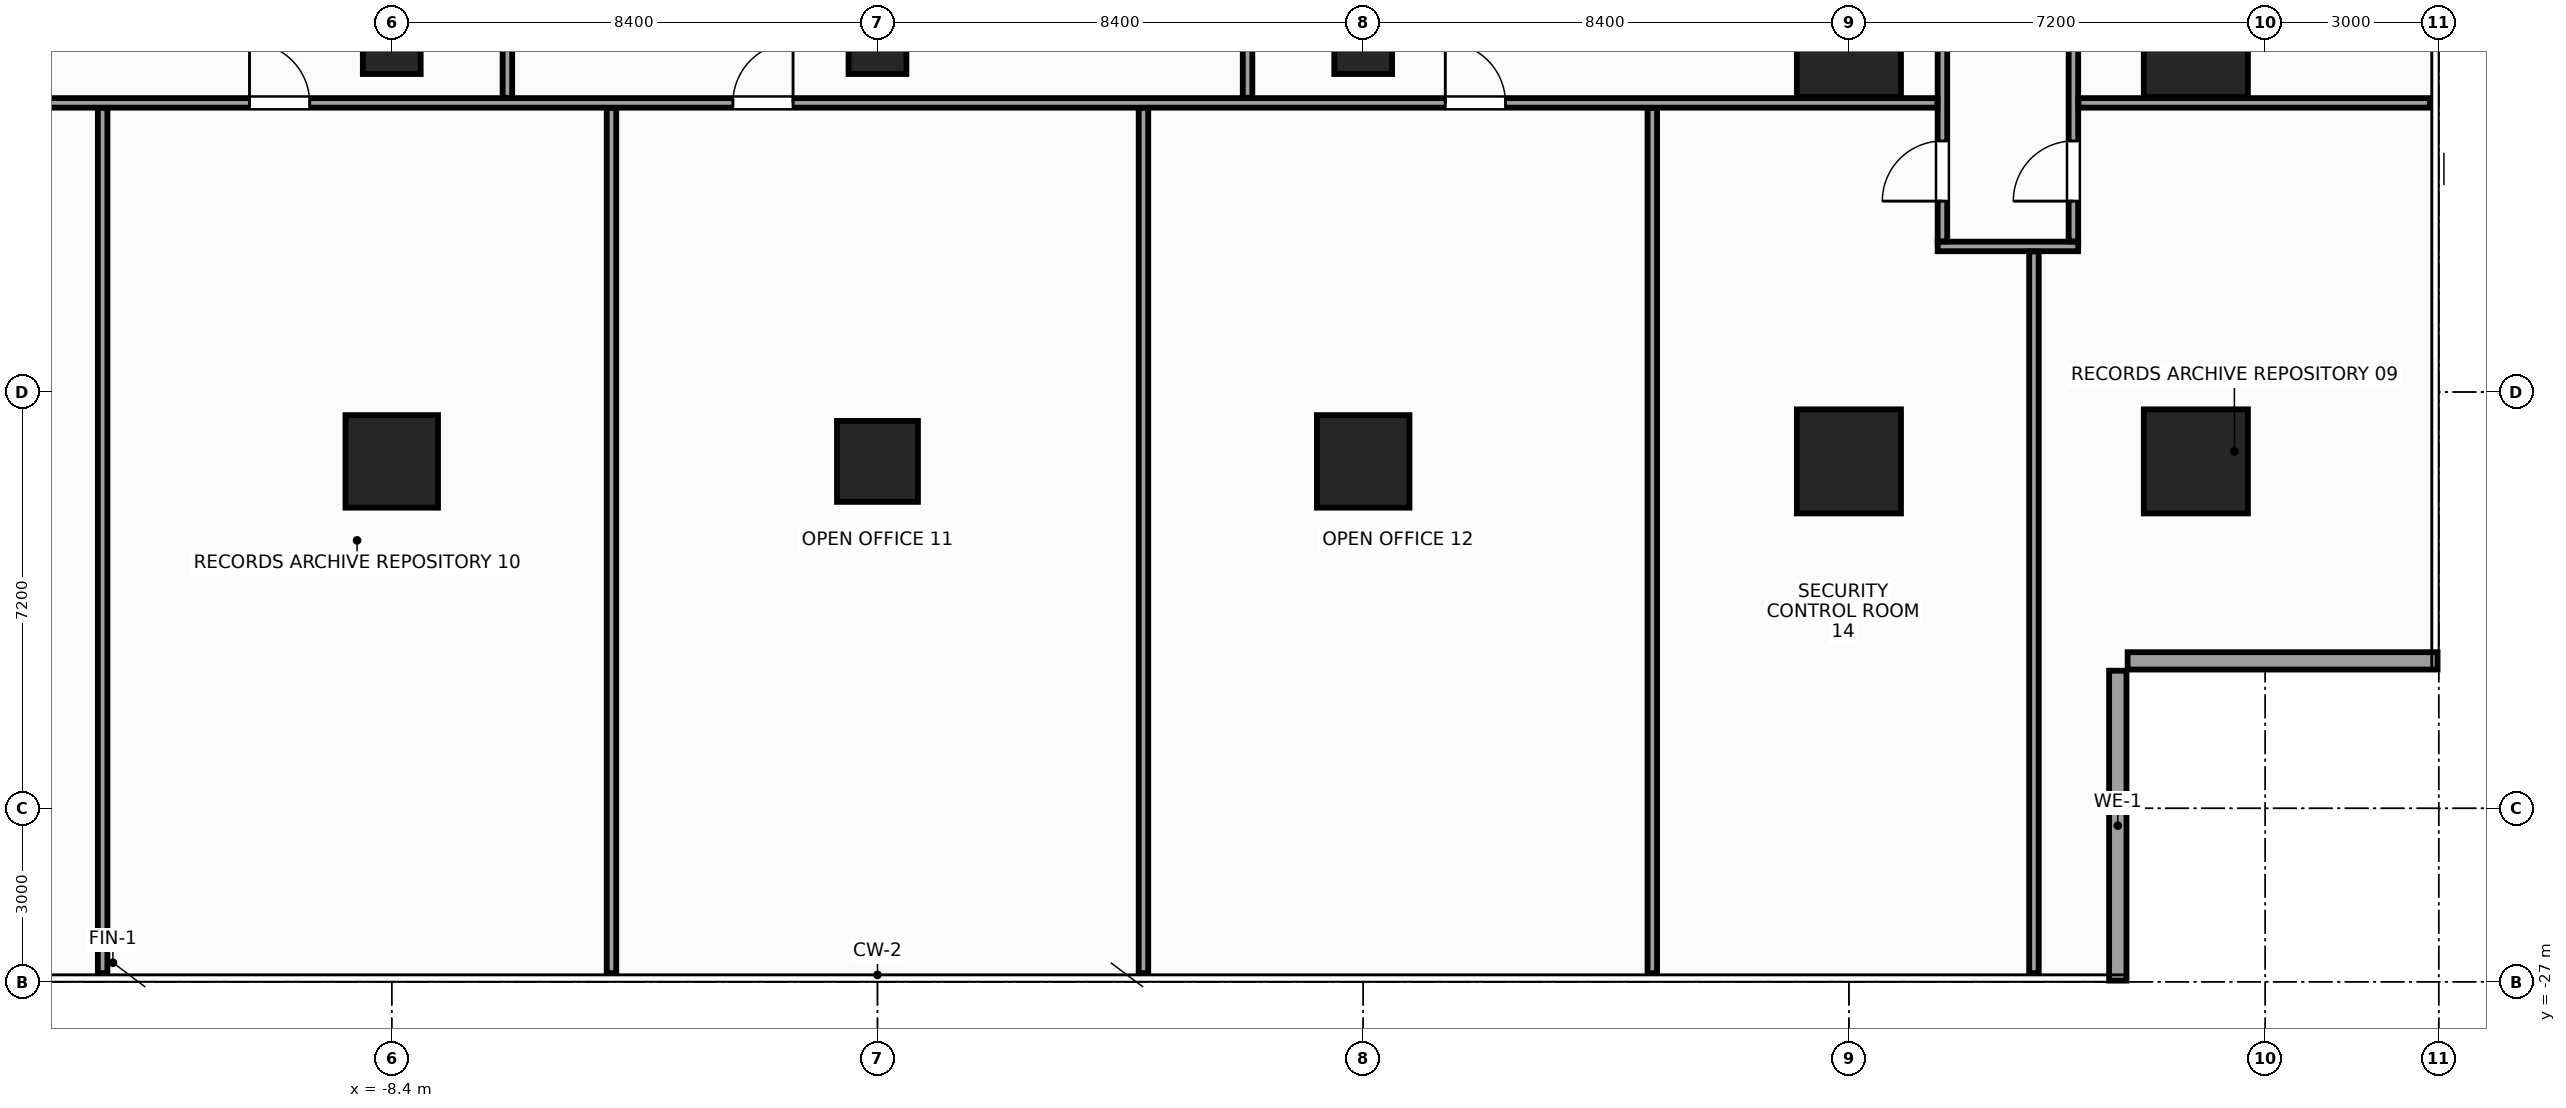
"""IFC4 building model, lengths in metres.
Left out: names, types, materials, properties, quantities, classifications, styles, units other than length and angle.
Written with IfcOpenShell. Run it as: python <this file> out.ifc"""

import sys

from ifc_helpers import new_model, si_unit, direction, frame, frame_2d, origin, origin_2d, place, context, subcontext, project, spatial, rectangle, hollow_rectangle, extrude, source, transform, mapped, element, fill, save


model = new_model("IFC4")
c1 = context("Model", 3, precision=1e-05, world=origin(), true_north=direction((0.0, 1.0)))
c2 = subcontext(c1, "Body", "Model", "MODEL_VIEW")
j1 = project(units=[si_unit("LENGTHUNIT", "METRE"), si_unit("PLANEANGLEUNIT", "RADIAN")], contexts=[c1])
p1 = place(None, origin())
s1 = spatial("IfcSite", under=j1, at=p1, CompositionType="ELEMENT")
p2 = place(p1, origin())
s2 = spatial("IfcBuilding", under=s1, at=p2, CompositionType="ELEMENT")
p3 = place(p2, frame((0.0, 0.0, 59.6)))
s3 = spatial("IfcBuildingStorey", under=s2, at=p3, CompositionType="ELEMENT", Elevation=59.6)
m1 = source(origin(), c2, "Body", "SweptSolid", [
    extrude(rectangle(XDim=1.8, YDim=1.8, at=origin_2d()), origin(), (0.0, 0.0, 1.0), 3.6),
])
for number, where, z_axis, x_axis in (
    (1, (16.8, -18.0, 0.0), (0.0, 0.0, 1.0), (1.0, 0.0, 0.0)),
    (2, (16.8, -10.8, 0.0), (0.0, 0.0, 1.0), (1.0, 0.0, 0.0)),
    (3, (22.8, -18.0, 0.0), (0.0, 0.0, 1.0), (1.0, 0.0, 0.0)),
    (4, (22.8, -10.8, 0.0), (0.0, 0.0, 1.0), (1.0, 0.0, 0.0)),
):
    element("IfcColumn", number, at=place(p3, frame(where, z_axis=z_axis, x_axis=x_axis)), inside=s3, PredefinedType="COLUMN", context=c2, shape_type="MappedRepresentation", body=[
        mapped(m1, transform((0.0, 0.0, 0.0), x_axis=(1.0, 0.0, 0.0), y_axis=(0.0, 1.0, 0.0), z_axis=(0.0, 0.0, 1.0), scale=1.0)),
    ])
m2 = source(origin(), c2, "Body", "SweptSolid", [
    extrude(rectangle(XDim=1.6, YDim=1.6, at=origin_2d()), origin(), (0.0, 0.0, 1.0), 3.6),
])
p4 = place(p3, frame((-8.4, -18.0, 0.0), z_axis=(0.0, 0.0, 1.0), x_axis=(1.0, 0.0, 0.0)))
e5 = element("IfcColumn", 5, at=p4, inside=s3, PredefinedType="COLUMN", context=c2, shape_type="MappedRepresentation", body=[
    mapped(m2, transform((0.0, 0.0, 0.0), x_axis=(1.0, 0.0, 0.0), y_axis=(0.0, 1.0, 0.0), z_axis=(0.0, 0.0, 1.0), scale=1.0)),
])
m3 = source(origin(), c2, "Body", "SweptSolid", [
    extrude(hollow_rectangle(XDim=1.0, YDim=1.0, WallThickness=0.045, at=origin_2d()), origin(), (0.0, 0.0, 1.0), 3.6),
])
p5 = place(p3, frame((-8.4, -10.8, 0.0), z_axis=(0.0, 0.0, 1.0), x_axis=(1.0, 0.0, 0.0)))
e6 = element("IfcColumn", 6, at=p5, inside=s3, PredefinedType="COLUMN", context=c2, shape_type="MappedRepresentation", body=[
    mapped(m3, transform((0.0, 0.0, 0.0), x_axis=(1.0, 0.0, 0.0), y_axis=(0.0, 1.0, 0.0), z_axis=(0.0, 0.0, 1.0), scale=1.0)),
])
p6 = place(p3, frame((8.4, -18.0, 0.0), z_axis=(0.0, 0.0, 1.0), x_axis=(1.0, 0.0, 0.0)))
e7 = element("IfcColumn", 7, at=p6, inside=s3, PredefinedType="COLUMN", context=c2, shape_type="MappedRepresentation", body=[
    mapped(m2, transform((0.0, 0.0, 0.0), x_axis=(1.0, 0.0, 0.0), y_axis=(0.0, 1.0, 0.0), z_axis=(0.0, 0.0, 1.0), scale=1.0)),
])
p7 = place(p3, frame((8.4, -10.8, 0.0), z_axis=(0.0, 0.0, 1.0), x_axis=(1.0, 0.0, 0.0)))
e8 = element("IfcColumn", 8, at=p7, inside=s3, PredefinedType="COLUMN", context=c2, shape_type="MappedRepresentation", body=[
    mapped(m3, transform((0.0, 0.0, 0.0), x_axis=(1.0, 0.0, 0.0), y_axis=(0.0, 1.0, 0.0), z_axis=(0.0, 0.0, 1.0), scale=1.0)),
])
m4 = source(origin(), c2, "Body", "SweptSolid", [
    extrude(rectangle(XDim=1.4, YDim=1.4, at=origin_2d()), origin(), (0.0, 0.0, 1.0), 3.6),
])
p8 = place(p3, frame((0.0, -18.0, 0.0), z_axis=(0.0, 0.0, 1.0), x_axis=(1.0, 0.0, 0.0)))
e9 = element("IfcColumn", 9, at=p8, inside=s3, PredefinedType="COLUMN", context=c2, shape_type="MappedRepresentation", body=[
    mapped(m4, transform((0.0, 0.0, 0.0), x_axis=(1.0, 0.0, 0.0), y_axis=(0.0, 1.0, 0.0), z_axis=(0.0, 0.0, 1.0), scale=1.0)),
])
m5 = source(origin(), c2, "Body", "SweptSolid", [
    extrude(rectangle(XDim=1.0, YDim=1.0, at=origin_2d()), origin(), (0.0, 0.0, 1.0), 3.6),
])
p9 = place(p3, frame((0.0, -10.8, 0.0), z_axis=(0.0, 0.0, 1.0), x_axis=(1.0, 0.0, 0.0)))
e10 = element("IfcColumn", 10, at=p9, inside=s3, PredefinedType="COLUMN", context=c2, shape_type="MappedRepresentation", body=[
    mapped(m5, transform((0.0, 0.0, 0.0), x_axis=(1.0, 0.0, 0.0), y_axis=(0.0, 1.0, 0.0), z_axis=(0.0, 0.0, 1.0), scale=1.0)),
])
m6 = source(origin(), c2, "Body", "SweptSolid", [
    extrude(rectangle(XDim=5.36, YDim=0.3, at=frame_2d((2.68, 0.0))), origin(), (0.0, 0.0, 1.0), 2.74),
])
for number, where, z_axis, x_axis in (
    (11, (21.45, -26.98, 0.0), (0.0, 0.0, 1.0), (0.0, 1.0, 0.0)),
    (12, (21.62, -21.45, 0.0), (0.0, 0.0, 1.0), (1.0, 0.0, 0.0)),
):
    element("IfcWall", number, at=place(p3, frame(where, z_axis=z_axis, x_axis=x_axis)), inside=s3, PredefinedType="STANDARD", context=c2, shape_type="MappedRepresentation", body=[
        mapped(m6, transform((0.0, 0.0, 0.0), x_axis=(1.0, 0.0, 0.0), y_axis=(0.0, 1.0, 0.0), z_axis=(0.0, 0.0, 1.0), scale=1.0)),
    ])
m7 = source(origin(), c2, "Body", "SweptSolid", [
    extrude(rectangle(XDim=2.43, YDim=0.165, at=frame_2d((1.215, 0.0))), origin(), (0.0, 0.0, 1.0), 2.745),
])
p10 = place(p3, frame((18.335, -14.282, 0.0), z_axis=(0.0, 0.0, 1.0), x_axis=(1.0, 0.0, 0.0)))
e13 = element("IfcWall", 13, at=p10, inside=s3, PredefinedType="PARTITIONING", context=c2, shape_type="MappedRepresentation", body=[
    mapped(m7, transform((0.0, 0.0, 0.0), x_axis=(1.0, 0.0, 0.0), y_axis=(0.0, 1.0, 0.0), z_axis=(0.0, 0.0, 1.0), scale=1.0)),
])
m8 = source(origin(), c2, "Body", "SweptSolid", [
    extrude(rectangle(XDim=21.995, YDim=0.165, at=frame_2d((10.998, 0.0))), origin(), (0.0, 0.0, 1.0), 2.745),
])
p11 = place(p3, frame((18.417, -14.195, 0.0), z_axis=(0.0, 0.0, 1.0), x_axis=(0.0, 1.0, 0.0)))
e14 = element("IfcWall", 14, at=p11, inside=s3, PredefinedType="PARTITIONING", context=c2, shape_type="MappedRepresentation", body=[
    mapped(m8, transform((0.0, 0.0, 0.0), x_axis=(1.0, 0.0, 0.0), y_axis=(0.0, 1.0, 0.0), z_axis=(0.0, 0.0, 1.0), scale=1.0)),
])
p12 = place(p11, frame((11.634, 0.0, 0.0)))
e15 = element("IfcOpeningElement", 15, at=p12, cuts=e14, PredefinedType="OPENING", context=c2, shape_type="SweptSolid", body=[
    extrude(rectangle(XDim=1.04, YDim=2.2, at=frame_2d((0.52, 1.1))), frame((0.0, 0.094, 0.0), z_axis=(0.0, -1.0, 0.0), x_axis=(1.0, 0.0, 0.0)), (0.0, 0.0, 1.0), 0.189),
])
p13 = place(p11, frame((0.696, 0.0, 0.0)))
e16 = element("IfcOpeningElement", 16, at=p13, cuts=e14, PredefinedType="OPENING", context=c2, shape_type="SweptSolid", body=[
    extrude(rectangle(XDim=1.04, YDim=2.2, at=frame_2d((0.52, 1.1))), frame((0.0, 0.094, 0.0), z_axis=(0.0, -1.0, 0.0), x_axis=(1.0, 0.0, 0.0)), (0.0, 0.0, 1.0), 0.189),
])
m9 = source(origin(), c2, "Body", "SweptSolid", [
    extrude(rectangle(XDim=24.108, YDim=0.165, at=frame_2d((12.054, 0.0))), origin(), (0.0, 0.0, 1.0), 2.745),
])
p14 = place(p3, frame((20.683, -14.195, 0.0), z_axis=(0.0, 0.0, 1.0), x_axis=(0.0, 1.0, 0.0)))
e17 = element("IfcWall", 17, at=p14, inside=s3, PredefinedType="PARTITIONING", context=c2, shape_type="MappedRepresentation", body=[
    mapped(m9, transform((0.0, 0.0, 0.0), x_axis=(1.0, 0.0, 0.0), y_axis=(0.0, 1.0, 0.0), z_axis=(0.0, 0.0, 1.0), scale=1.0)),
])
p15 = place(p14, frame((12.052, 0.0, 0.0)))
e18 = element("IfcOpeningElement", 18, at=p15, cuts=e17, PredefinedType="OPENING", context=c2, shape_type="SweptSolid", body=[
    extrude(rectangle(XDim=1.04, YDim=2.2, at=frame_2d((0.52, 1.1))), frame((0.0, 0.094, 0.0), z_axis=(0.0, -1.0, 0.0), x_axis=(1.0, 0.0, 0.0)), (0.0, 0.0, 1.0), 0.189),
])
p16 = place(p14, frame((0.696, 0.0, 0.0)))
e19 = element("IfcOpeningElement", 19, at=p16, cuts=e17, PredefinedType="OPENING", context=c2, shape_type="SweptSolid", body=[
    extrude(rectangle(XDim=1.04, YDim=2.2, at=frame_2d((0.52, 1.1))), frame((0.0, 0.094, 0.0), z_axis=(0.0, -1.0, 0.0), x_axis=(1.0, 0.0, 0.0)), (0.0, 0.0, 1.0), 0.189),
])
m10 = source(origin(), c2, "Body", "SweptSolid", [
    extrude(rectangle(XDim=36.66, YDim=0.165, at=frame_2d((18.33, 0.0))), origin(), (0.0, 0.0, 1.0), 2.945),
])
p17 = place(p3, frame((-18.33, -11.8, 0.0), z_axis=(0.0, 0.0, 1.0), x_axis=(1.0, 0.0, 0.0)))
e20 = element("IfcWall", 20, at=p17, inside=s3, PredefinedType="PARTITIONING", context=c2, shape_type="MappedRepresentation", body=[
    mapped(m10, transform((0.0, 0.0, 0.0), x_axis=(1.0, 0.0, 0.0), y_axis=(0.0, 1.0, 0.0), z_axis=(0.0, 0.0, 1.0), scale=1.0)),
])
p18 = place(p17, frame((7.47, 0.0, 0.0)))
e21 = element("IfcOpeningElement", 21, at=p18, cuts=e20, PredefinedType="OPENING", context=c2, shape_type="SweptSolid", body=[
    extrude(rectangle(XDim=1.04, YDim=2.2, at=frame_2d((0.52, 1.1))), frame((0.0, 0.094, 0.0), z_axis=(0.0, -1.0, 0.0), x_axis=(1.0, 0.0, 0.0)), (0.0, 0.0, 1.0), 0.189),
])
p19 = place(p17, frame((15.83, 0.0, 0.0)))
e22 = element("IfcOpeningElement", 22, at=p19, cuts=e20, PredefinedType="OPENING", context=c2, shape_type="SweptSolid", body=[
    extrude(rectangle(XDim=1.04, YDim=2.2, at=frame_2d((0.52, 1.1))), frame((0.0, 0.094, 0.0), z_axis=(0.0, -1.0, 0.0), x_axis=(1.0, 0.0, 0.0)), (0.0, 0.0, 1.0), 0.189),
])
p20 = place(p17, frame((28.15, 0.0, 0.0)))
e23 = element("IfcOpeningElement", 23, at=p20, cuts=e20, PredefinedType="OPENING", context=c2, shape_type="SweptSolid", body=[
    extrude(rectangle(XDim=1.04, YDim=2.2, at=frame_2d((0.52, 1.1))), frame((0.0, 0.094, 0.0), z_axis=(0.0, -1.0, 0.0), x_axis=(1.0, 0.0, 0.0)), (0.0, 0.0, 1.0), 0.189),
])
m11 = source(origin(), c2, "Body", "SweptSolid", [
    extrude(rectangle(XDim=6.08, YDim=0.165, at=frame_2d((3.04, 0.0))), origin(), (0.0, 0.0, 1.0), 2.945),
])
p21 = place(p3, frame((20.77, -11.8, 0.0), z_axis=(0.0, 0.0, 1.0), x_axis=(1.0, 0.0, 0.0)))
e24 = element("IfcWall", 24, at=p21, inside=s3, PredefinedType="PARTITIONING", context=c2, shape_type="MappedRepresentation", body=[
    mapped(m11, transform((0.0, 0.0, 0.0), x_axis=(1.0, 0.0, 0.0), y_axis=(0.0, 1.0, 0.0), z_axis=(0.0, 0.0, 1.0), scale=1.0)),
])
m12 = source(origin(), c2, "Body", "SweptSolid", [
    extrude(rectangle(XDim=19.342, YDim=0.165, at=frame_2d((9.671, 0.0))), origin(), (0.0, 0.0, 1.0), 2.645),
])
for number, where, z_axis, x_axis in (
    (25, (-6.4, -11.712, 0.0), (0.0, 0.0, 1.0), (0.0, 1.0, 0.0)),
    (26, (6.4, -11.712, 0.0), (0.0, 0.0, 1.0), (0.0, 1.0, 0.0)),
):
    element("IfcWall", number, at=place(p3, frame(where, z_axis=z_axis, x_axis=x_axis)), inside=s3, PredefinedType="PARTITIONING", context=c2, shape_type="MappedRepresentation", body=[
        mapped(m12, transform((0.0, 0.0, 0.0), x_axis=(1.0, 0.0, 0.0), y_axis=(0.0, 1.0, 0.0), z_axis=(0.0, 0.0, 1.0), scale=1.0)),
    ])
m13 = source(origin(), c2, "Body", "SweptSolid", [
    extrude(rectangle(XDim=14.963, YDim=0.165, at=frame_2d((7.481, 0.0))), origin(), (0.0, 0.0, 1.0), 2.745),
])
for number, where, z_axis, x_axis in (
    (27, (-13.4, -26.85, 0.0), (0.0, 0.0, 1.0), (0.0, 1.0, 0.0)),
    (28, (-4.6, -26.85, 0.0), (0.0, 0.0, 1.0), (0.0, 1.0, 0.0)),
    (29, (4.6, -26.85, 0.0), (0.0, 0.0, 1.0), (0.0, 1.0, 0.0)),
    (30, (13.4, -26.85, 0.0), (0.0, 0.0, 1.0), (0.0, 1.0, 0.0)),
):
    element("IfcWall", number, at=place(p3, frame(where, z_axis=z_axis, x_axis=x_axis)), inside=s3, PredefinedType="PARTITIONING", context=c2, shape_type="MappedRepresentation", body=[
        mapped(m13, transform((0.0, 0.0, 0.0), x_axis=(1.0, 0.0, 0.0), y_axis=(0.0, 1.0, 0.0), z_axis=(0.0, 0.0, 1.0), scale=1.0)),
    ])
m14 = source(origin(), c2, "Body", "SweptSolid", [
    extrude(rectangle(XDim=12.48, YDim=0.165, at=frame_2d((6.24, 0.0))), origin(), (0.0, 0.0, 1.0), 2.745),
])
p22 = place(p3, frame((20.0, -26.85, 0.0), z_axis=(0.0, 0.0, 1.0), x_axis=(0.0, 1.0, 0.0)))
e31 = element("IfcWall", 31, at=p22, inside=s3, PredefinedType="PARTITIONING", context=c2, shape_type="MappedRepresentation", body=[
    mapped(m14, transform((0.0, 0.0, 0.0), x_axis=(1.0, 0.0, 0.0), y_axis=(0.0, 1.0, 0.0), z_axis=(0.0, 0.0, 1.0), scale=1.0)),
])
m15 = source(origin(), c2, "Body", "SweptSolid", [
    extrude(rectangle(XDim=1.04, YDim=2.2, at=frame_2d((0.52, 1.1))), frame((0.0, 0.025, 0.0), z_axis=(0.0, -1.0, 0.0), x_axis=(1.0, 0.0, 0.0)), (0.0, 0.0, 1.0), 0.05),
])
p23 = place(p16, origin())
e32 = element("IfcDoor", 32, at=p23, inside=s3, OperationType="SINGLE_SWING_LEFT", PredefinedType="DOOR", context=c2, shape_type="MappedRepresentation", body=[
    mapped(m15, transform((0.0, 0.0, 0.0), x_axis=(1.0, 0.0, 0.0), y_axis=(0.0, 1.0, 0.0), z_axis=(0.0, 0.0, 1.0), scale=1.0)),
])
fill(e19, e32)
p24 = place(p13, origin())
e33 = element("IfcDoor", 33, at=p24, inside=s3, OperationType="SINGLE_SWING_LEFT", PredefinedType="DOOR", context=c2, shape_type="MappedRepresentation", body=[
    mapped(m15, transform((0.0, 0.0, 0.0), x_axis=(1.0, 0.0, 0.0), y_axis=(0.0, 1.0, 0.0), z_axis=(0.0, 0.0, 1.0), scale=1.0)),
])
fill(e16, e33)
p25 = place(p18, origin())
e34 = element("IfcDoor", 34, at=p25, inside=s3, OperationType="SINGLE_SWING_LEFT", PredefinedType="DOOR", context=c2, shape_type="MappedRepresentation", body=[
    mapped(m15, transform((0.0, 0.0, 0.0), x_axis=(1.0, 0.0, 0.0), y_axis=(0.0, 1.0, 0.0), z_axis=(0.0, 0.0, 1.0), scale=1.0)),
])
fill(e21, e34)
p26 = place(p19, origin())
e35 = element("IfcDoor", 35, at=p26, inside=s3, OperationType="SINGLE_SWING_RIGHT", PredefinedType="DOOR", context=c2, shape_type="MappedRepresentation", body=[
    mapped(m15, transform((0.0, 0.0, 0.0), x_axis=(1.0, 0.0, 0.0), y_axis=(0.0, 1.0, 0.0), z_axis=(0.0, 0.0, 1.0), scale=1.0)),
])
fill(e22, e35)
p27 = place(p20, origin())
e36 = element("IfcDoor", 36, at=p27, inside=s3, OperationType="SINGLE_SWING_LEFT", PredefinedType="DOOR", context=c2, shape_type="MappedRepresentation", body=[
    mapped(m15, transform((0.0, 0.0, 0.0), x_axis=(1.0, 0.0, 0.0), y_axis=(0.0, 1.0, 0.0), z_axis=(0.0, 0.0, 1.0), scale=1.0)),
])
fill(e23, e36)
save(model, sys.argv[1])
